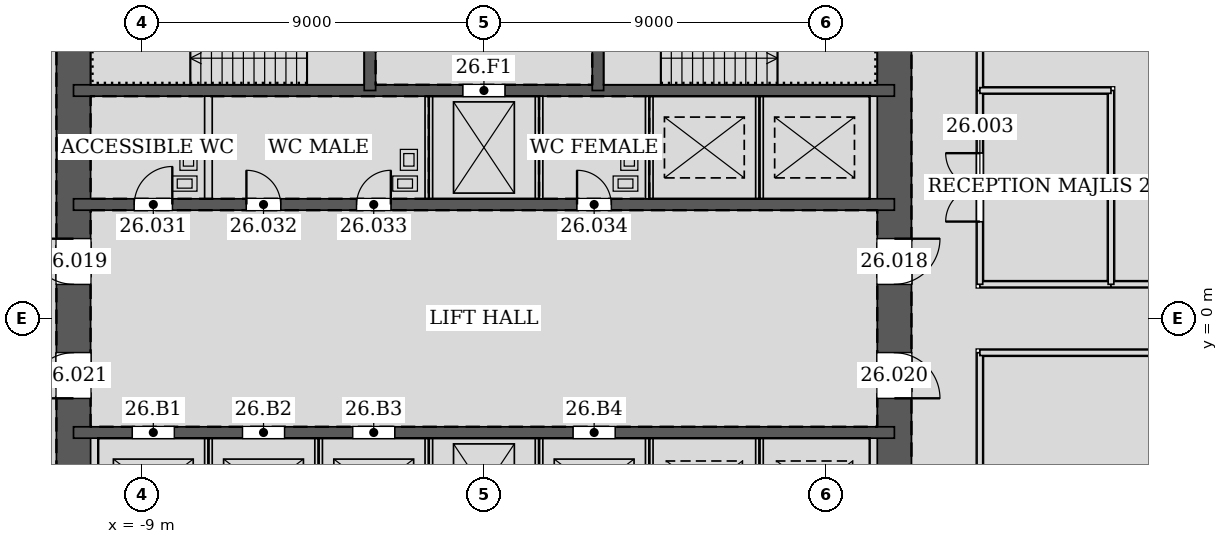
"""IFC4 building model, lengths in metres.
Left out: names, types, materials, properties, quantities, classifications, styles, units other than length and angle.
Written with IfcOpenShell. Run it as: python <this file> out.ifc"""

import sys

from ifc_helpers import new_model, si_unit, direction, frame, frame_2d, origin, place, context, subcontext, project, spatial, rectangle, extrude, element, fill, save


model = new_model("IFC4")
c1 = context("Model", 3, precision=1e-05, world=origin(), true_north=direction((0.0, 1.0)))
c2 = subcontext(c1, "Body", "Model", "MODEL_VIEW")
j1 = project(units=[si_unit("LENGTHUNIT", "METRE"), si_unit("PLANEANGLEUNIT", "RADIAN")], contexts=[c1])
p1 = place(None, origin())
s1 = spatial("IfcSite", under=j1, at=p1, CompositionType="ELEMENT")
p2 = place(p1, origin())
s2 = spatial("IfcBuilding", under=s1, at=p2, CompositionType="ELEMENT")
p3 = place(p2, frame((0.0, 0.0, 117.6)))
s3 = spatial("IfcBuildingStorey", under=s2, at=p3, CompositionType="ELEMENT", Elevation=117.6)
p4 = place(p3, frame((10.8, -10.8, 0.0), z_axis=(0.0, 0.0, 1.0), x_axis=(0.0, 1.0, 0.0)))
e1 = element("IfcWall", 1, at=p4, inside=s3, PredefinedType="SOLIDWALL", context=c2, shape_type="SweptSolid", body=[
    extrude(rectangle(XDim=21.6, YDim=0.9, at=frame_2d((10.8, 0.0))), origin(), (0.0, 0.0, 1.0), 4.2),
])
p5 = place(p4, frame((11.7, 0.0, 0.0)))
e2 = element("IfcOpeningElement", 2, at=p5, cuts=e1, PredefinedType="OPENING", context=c2, shape_type="SweptSolid", body=[
    extrude(rectangle(XDim=1.2, YDim=2.1, at=frame_2d((0.6, 1.05))), frame((0.0, 0.46, 0.0), z_axis=(0.0, -1.0, 0.0), x_axis=(1.0, 0.0, 0.0)), (0.0, 0.0, 1.0), 0.92),
])
p6 = place(p4, frame((8.7, 0.0, 0.0)))
e3 = element("IfcOpeningElement", 3, at=p6, cuts=e1, PredefinedType="OPENING", context=c2, shape_type="SweptSolid", body=[
    extrude(rectangle(XDim=1.2, YDim=2.1, at=frame_2d((0.6, 1.05))), frame((0.0, 0.46, 0.0), z_axis=(0.0, -1.0, 0.0), x_axis=(1.0, 0.0, 0.0)), (0.0, 0.0, 1.0), 0.92),
])
p7 = place(p3, frame((-10.8, 10.8, 0.0), z_axis=(0.0, 0.0, 1.0), x_axis=(0.0, -1.0, 0.0)))
e4 = element("IfcWall", 4, at=p7, inside=s3, PredefinedType="SOLIDWALL", context=c2, shape_type="SweptSolid", body=[
    extrude(rectangle(XDim=21.6, YDim=0.9, at=frame_2d((10.8, 0.0))), origin(), (0.0, 0.0, 1.0), 4.2),
])
p8 = place(p7, frame((8.7, 0.0, 0.0)))
e5 = element("IfcOpeningElement", 5, at=p8, cuts=e4, PredefinedType="OPENING", context=c2, shape_type="SweptSolid", body=[
    extrude(rectangle(XDim=1.2, YDim=2.1, at=frame_2d((0.6, 1.05))), frame((0.0, 0.46, 0.0), z_axis=(0.0, -1.0, 0.0), x_axis=(1.0, 0.0, 0.0)), (0.0, 0.0, 1.0), 0.92),
])
p9 = place(p7, frame((11.7, 0.0, 0.0)))
e6 = element("IfcOpeningElement", 6, at=p9, cuts=e4, PredefinedType="OPENING", context=c2, shape_type="SweptSolid", body=[
    extrude(rectangle(XDim=1.2, YDim=2.1, at=frame_2d((0.6, 1.05))), frame((0.0, 0.46, 0.0), z_axis=(0.0, -1.0, 0.0), x_axis=(1.0, 0.0, 0.0)), (0.0, 0.0, 1.0), 0.92),
])
p10 = place(p3, frame((-10.8, 3.0, 0.0), z_axis=(0.0, 0.0, 1.0), x_axis=(1.0, 0.0, 0.0)))
e7 = element("IfcWall", 7, at=p10, inside=s3, PredefinedType="SOLIDWALL", context=c2, shape_type="SweptSolid", body=[
    extrude(rectangle(XDim=21.6, YDim=0.3, at=frame_2d((10.8, 0.0))), origin(), (0.0, 0.0, 1.0), 4.2),
])
p11 = place(p10, frame((1.6, 0.0, 0.0)))
e8 = element("IfcOpeningElement", 8, at=p11, cuts=e7, PredefinedType="OPENING", context=c2, shape_type="SweptSolid", body=[
    extrude(rectangle(XDim=1.0, YDim=2.1, at=frame_2d((0.5, 1.05))), frame((0.0, 0.16, 0.0), z_axis=(0.0, -1.0, 0.0), x_axis=(1.0, 0.0, 0.0)), (0.0, 0.0, 1.0), 0.32),
])
p12 = place(p10, frame((4.55, 0.0, 0.0)))
e9 = element("IfcOpeningElement", 9, at=p12, cuts=e7, PredefinedType="OPENING", context=c2, shape_type="SweptSolid", body=[
    extrude(rectangle(XDim=0.9, YDim=2.1, at=frame_2d((0.45, 1.05))), frame((0.0, 0.16, 0.0), z_axis=(0.0, -1.0, 0.0), x_axis=(1.0, 0.0, 0.0)), (0.0, 0.0, 1.0), 0.32),
])
p13 = place(p10, frame((7.45, 0.0, 0.0)))
e10 = element("IfcOpeningElement", 10, at=p13, cuts=e7, PredefinedType="OPENING", context=c2, shape_type="SweptSolid", body=[
    extrude(rectangle(XDim=0.9, YDim=2.1, at=frame_2d((0.45, 1.05))), frame((0.0, 0.16, 0.0), z_axis=(0.0, -1.0, 0.0), x_axis=(1.0, 0.0, 0.0)), (0.0, 0.0, 1.0), 0.32),
])
p14 = place(p10, frame((13.25, 0.0, 0.0)))
e11 = element("IfcOpeningElement", 11, at=p14, cuts=e7, PredefinedType="OPENING", context=c2, shape_type="SweptSolid", body=[
    extrude(rectangle(XDim=0.9, YDim=2.1, at=frame_2d((0.45, 1.05))), frame((0.0, 0.16, 0.0), z_axis=(0.0, -1.0, 0.0), x_axis=(1.0, 0.0, 0.0)), (0.0, 0.0, 1.0), 0.32),
])
p15 = place(p3, frame((-10.8, 6.0, 0.0), z_axis=(0.0, 0.0, 1.0), x_axis=(1.0, 0.0, 0.0)))
e12 = element("IfcWall", 12, at=p15, inside=s3, PredefinedType="SOLIDWALL", context=c2, shape_type="SweptSolid", body=[
    extrude(rectangle(XDim=21.6, YDim=0.3, at=frame_2d((10.8, 0.0))), origin(), (0.0, 0.0, 1.0), 4.2),
])
p16 = place(p15, frame((10.25, 0.0, 0.0)))
e13 = element("IfcOpeningElement", 13, at=p16, cuts=e12, PredefinedType="OPENING", context=c2, shape_type="SweptSolid", body=[
    extrude(rectangle(XDim=1.1, YDim=2.1, at=frame_2d((0.55, 1.05))), frame((0.0, 0.16, 0.0), z_axis=(0.0, -1.0, 0.0), x_axis=(1.0, 0.0, 0.0)), (0.0, 0.0, 1.0), 0.32),
])
p17 = place(p3, frame((-3.0, 6.0, 0.0), z_axis=(0.0, 0.0, 1.0), x_axis=(0.0, 1.0, 0.0)))
e14 = element("IfcWall", 14, at=p17, inside=s3, PredefinedType="SOLIDWALL", context=c2, shape_type="SweptSolid", body=[
    extrude(rectangle(XDim=4.8, YDim=0.3, at=frame_2d((2.4, 0.0))), origin(), (0.0, 0.0, 1.0), 4.2),
])
p18 = place(p17, frame((1.75, 0.0, 0.0)))
e15 = element("IfcOpeningElement", 15, at=p18, cuts=e14, PredefinedType="OPENING", context=c2, shape_type="SweptSolid", body=[
    extrude(rectangle(XDim=1.0, YDim=2.1, at=frame_2d((0.5, 1.05))), frame((0.0, 0.16, 0.0), z_axis=(0.0, -1.0, 0.0), x_axis=(1.0, 0.0, 0.0)), (0.0, 0.0, 1.0), 0.32),
])
p19 = place(p3, frame((3.0, 6.0, 0.0), z_axis=(0.0, 0.0, 1.0), x_axis=(0.0, 1.0, 0.0)))
e16 = element("IfcWall", 16, at=p19, inside=s3, PredefinedType="SOLIDWALL", context=c2, shape_type="SweptSolid", body=[
    extrude(rectangle(XDim=4.8, YDim=0.3, at=frame_2d((2.4, 0.0))), origin(), (0.0, 0.0, 1.0), 4.2),
])
p20 = place(p19, frame((1.75, 0.0, 0.0)))
e17 = element("IfcOpeningElement", 17, at=p20, cuts=e16, PredefinedType="OPENING", context=c2, shape_type="SweptSolid", body=[
    extrude(rectangle(XDim=1.0, YDim=2.1, at=frame_2d((0.5, 1.05))), frame((0.0, 0.16, 0.0), z_axis=(0.0, -1.0, 0.0), x_axis=(1.0, 0.0, 0.0)), (0.0, 0.0, 1.0), 0.32),
])
p21 = place(p3, frame((-10.8, -3.0, 0.0), z_axis=(0.0, 0.0, 1.0), x_axis=(1.0, 0.0, 0.0)))
e18 = element("IfcWall", 18, at=p21, inside=s3, PredefinedType="SOLIDWALL", context=c2, shape_type="SweptSolid", body=[
    extrude(rectangle(XDim=21.6, YDim=0.3, at=frame_2d((10.8, 0.0))), origin(), (0.0, 0.0, 1.0), 4.2),
])
p22 = place(p21, frame((1.55, 0.0, 0.0)))
e19 = element("IfcOpeningElement", 19, at=p22, cuts=e18, PredefinedType="OPENING", context=c2, shape_type="SweptSolid", body=[
    extrude(rectangle(XDim=1.1, YDim=2.1, at=frame_2d((0.55, 1.05))), frame((0.0, 0.16, 0.0), z_axis=(0.0, -1.0, 0.0), x_axis=(1.0, 0.0, 0.0)), (0.0, 0.0, 1.0), 0.32),
])
p23 = place(p21, frame((4.45, 0.0, 0.0)))
e20 = element("IfcOpeningElement", 20, at=p23, cuts=e18, PredefinedType="OPENING", context=c2, shape_type="SweptSolid", body=[
    extrude(rectangle(XDim=1.1, YDim=2.1, at=frame_2d((0.55, 1.05))), frame((0.0, 0.16, 0.0), z_axis=(0.0, -1.0, 0.0), x_axis=(1.0, 0.0, 0.0)), (0.0, 0.0, 1.0), 0.32),
])
p24 = place(p21, frame((7.35, 0.0, 0.0)))
e21 = element("IfcOpeningElement", 21, at=p24, cuts=e18, PredefinedType="OPENING", context=c2, shape_type="SweptSolid", body=[
    extrude(rectangle(XDim=1.1, YDim=2.1, at=frame_2d((0.55, 1.05))), frame((0.0, 0.16, 0.0), z_axis=(0.0, -1.0, 0.0), x_axis=(1.0, 0.0, 0.0)), (0.0, 0.0, 1.0), 0.32),
])
p25 = place(p21, frame((13.15, 0.0, 0.0)))
e22 = element("IfcOpeningElement", 22, at=p25, cuts=e18, PredefinedType="OPENING", context=c2, shape_type="SweptSolid", body=[
    extrude(rectangle(XDim=1.1, YDim=2.1, at=frame_2d((0.55, 1.05))), frame((0.0, 0.16, 0.0), z_axis=(0.0, -1.0, 0.0), x_axis=(1.0, 0.0, 0.0)), (0.0, 0.0, 1.0), 0.32),
])
p26 = place(p3, frame((16.501, 0.9, 0.0), z_axis=(0.0, 0.0, 1.0), x_axis=(-1.0, 0.0, 0.0)))
e23 = element("IfcWall", 23, at=p26, inside=s3, PredefinedType="PARTITIONING", context=c2, shape_type="SweptSolid", body=[
    extrude(rectangle(XDim=3.451, YDim=0.15, at=frame_2d((1.726, 0.0))), origin(), (0.0, 0.0, 1.0), 3.426),
])
p27 = place(p3, frame((13.05, 0.9, 0.0), z_axis=(0.0, 0.0, 1.0), x_axis=(0.0, 1.0, 0.0)))
e24 = element("IfcWall", 24, at=p27, inside=s3, PredefinedType="PARTITIONING", context=c2, shape_type="SweptSolid", body=[
    extrude(rectangle(XDim=5.101, YDim=0.15, at=frame_2d((2.551, 0.0))), origin(), (0.0, 0.0, 1.0), 4.035),
])
p28 = place(p27, frame((1.65, 0.0, 0.0)))
e25 = element("IfcOpeningElement", 25, at=p28, cuts=e24, PredefinedType="OPENING", context=c2, shape_type="SweptSolid", body=[
    extrude(rectangle(XDim=1.8, YDim=2.4, at=frame_2d((0.9, 1.2))), frame((0.0, 0.085, 0.0), z_axis=(0.0, -1.0, 0.0), x_axis=(1.0, 0.0, 0.0)), (0.0, 0.0, 1.0), 0.17),
])
p29 = place(p3, frame((13.05, 5.999, 0.0), z_axis=(0.0, 0.0, 1.0), x_axis=(0.0, 1.0, 0.0)))
e26 = element("IfcWall", 26, at=p29, inside=s3, PredefinedType="PARTITIONING", context=c2, shape_type="SweptSolid", body=[
    extrude(rectangle(XDim=7.051, YDim=0.15, at=frame_2d((3.525, 0.0))), origin(), (0.0, 0.0, 1.0), 3.098),
])
p30 = place(p3, frame((24.67, 0.9, 0.0), z_axis=(0.0, 0.0, 1.0), x_axis=(-1.0, 0.0, 0.0)))
e27 = element("IfcWall", 27, at=p30, inside=s3, PredefinedType="PARTITIONING", context=c2, shape_type="SweptSolid", body=[
    extrude(rectangle(XDim=8.171, YDim=0.15, at=frame_2d((4.085, 0.0))), origin(), (0.0, 0.0, 1.0), 3.491),
])
p31 = place(p3, frame((13.05, -13.05, 0.0), z_axis=(0.0, 0.0, 1.0), x_axis=(0.0, 1.0, 0.0)))
e28 = element("IfcWall", 28, at=p31, inside=s3, PredefinedType="PARTITIONING", context=c2, shape_type="SweptSolid", body=[
    extrude(rectangle(XDim=12.15, YDim=0.15, at=frame_2d((6.075, 0.0))), origin(), (0.0, 0.0, 1.0), 3.098),
])
p32 = place(p3, frame((13.05, -0.9, 0.0), z_axis=(0.0, 0.0, 1.0), x_axis=(1.0, 0.0, 0.0)))
e29 = element("IfcWall", 29, at=p32, inside=s3, PredefinedType="PARTITIONING", context=c2, shape_type="SweptSolid", body=[
    extrude(rectangle(XDim=11.62, YDim=0.15, at=frame_2d((5.81, 0.0))), origin(), (0.0, 0.0, 1.0), 3.426),
])
p33 = place(p3, frame((16.5, 0.9, 0.0), z_axis=(0.0, 0.0, 1.0), x_axis=(0.0, 1.0, 0.0)))
e30 = element("IfcWall", 30, at=p33, inside=s3, PredefinedType="PARTITIONING", context=c2, shape_type="SweptSolid", body=[
    extrude(rectangle(XDim=5.1, YDim=0.15, at=frame_2d((2.55, 0.0))), origin(), (0.0, 0.0, 1.0), 4.035),
])
p34 = place(p3, frame((16.5, 6.0, 0.0), z_axis=(0.0, 0.0, 1.0), x_axis=(-1.0, 0.0, 0.0)))
e31 = element("IfcWall", 31, at=p34, inside=s3, PredefinedType="PARTITIONING", context=c2, shape_type="SweptSolid", body=[
    extrude(rectangle(XDim=3.45, YDim=0.15, at=frame_2d((1.725, 0.0))), origin(), (0.0, 0.0, 1.0), 3.426),
])
for number, where, z_axis, x_axis in (
    (32, (-7.25, 3.15, 0.0), (0.0, 0.0, 1.0), (0.0, 1.0, 0.0)),
    (33, (-1.45, 3.15, 0.0), (0.0, 0.0, 1.0), (0.0, 1.0, 0.0)),
    (34, (1.45, 3.15, 0.0), (0.0, 0.0, 1.0), (0.0, 1.0, 0.0)),
    (35, (4.35, 3.15, 0.0), (0.0, 0.0, 1.0), (0.0, 1.0, 0.0)),
):
    element("IfcWall", number, at=place(p3, frame(where, z_axis=z_axis, x_axis=x_axis)), inside=s3, PredefinedType="PARTITIONING", context=c2, shape_type="SweptSolid", body=[
        extrude(rectangle(XDim=2.7, YDim=0.2, at=frame_2d((1.35, 0.0))), origin(), (0.0, 0.0, 1.0), 4.035),
    ])
for number, where, z_axis, x_axis in (
    (36, (7.25, 3.15, 0.0), (0.0, 0.0, 1.0), (0.0, 1.0, 0.0)),
    (37, (-7.25, -5.85, 0.0), (0.0, 0.0, 1.0), (0.0, 1.0, 0.0)),
    (38, (-4.35, -5.85, 0.0), (0.0, 0.0, 1.0), (0.0, 1.0, 0.0)),
    (39, (-1.45, -5.85, 0.0), (0.0, 0.0, 1.0), (0.0, 1.0, 0.0)),
    (40, (1.45, -5.85, 0.0), (0.0, 0.0, 1.0), (0.0, 1.0, 0.0)),
    (41, (4.35, -5.85, 0.0), (0.0, 0.0, 1.0), (0.0, 1.0, 0.0)),
    (42, (7.25, -5.85, 0.0), (0.0, 0.0, 1.0), (0.0, 1.0, 0.0)),
):
    element("IfcWall", number, at=place(p3, frame(where, z_axis=z_axis, x_axis=x_axis)), inside=s3, PredefinedType="PARTITIONING", context=c2, shape_type="SweptSolid", body=[
        extrude(rectangle(XDim=2.7, YDim=0.2, at=frame_2d((1.35, 0.0))), origin(), (0.0, 0.0, 1.0), 4.2),
    ])
p35 = place(p28, origin())
e43 = element("IfcDoor", 43, at=p35, inside=s3, OperationType="DOUBLE_DOOR_SINGLE_SWING", PredefinedType="DOOR", context=c2, shape_type="SweptSolid", body=[
    extrude(rectangle(XDim=1.8, YDim=2.4, at=frame_2d((0.9, 1.2))), frame((0.0, 0.025, 0.0), z_axis=(0.0, -1.0, 0.0), x_axis=(1.0, 0.0, 0.0)), (0.0, 0.0, 1.0), 0.05),
])
fill(e25, e43)
p36 = place(p5, frame((1.2, 0.0, 0.0), z_axis=(0.0, 0.0, 1.0), x_axis=(-1.0, 0.0, 0.0)))
e44 = element("IfcDoor", 44, at=p36, inside=s3, OperationType="SINGLE_SWING_LEFT", PredefinedType="DOOR", context=c2, shape_type="SweptSolid", body=[
    extrude(rectangle(XDim=1.2, YDim=2.1, at=frame_2d((0.6, 1.05))), frame((0.0, 0.025, 0.0), z_axis=(0.0, -1.0, 0.0), x_axis=(1.0, 0.0, 0.0)), (0.0, 0.0, 1.0), 0.05),
])
fill(e2, e44)
p37 = place(p8, frame((1.2, 0.0, 0.0), z_axis=(0.0, 0.0, 1.0), x_axis=(-1.0, 0.0, 0.0)))
e45 = element("IfcDoor", 45, at=p37, inside=s3, OperationType="SINGLE_SWING_RIGHT", PredefinedType="DOOR", context=c2, shape_type="SweptSolid", body=[
    extrude(rectangle(XDim=1.2, YDim=2.1, at=frame_2d((0.6, 1.05))), frame((0.0, 0.025, 0.0), z_axis=(0.0, -1.0, 0.0), x_axis=(1.0, 0.0, 0.0)), (0.0, 0.0, 1.0), 0.05),
])
fill(e5, e45)
p38 = place(p6, frame((1.2, 0.0, 0.0), z_axis=(0.0, 0.0, 1.0), x_axis=(-1.0, 0.0, 0.0)))
e46 = element("IfcDoor", 46, at=p38, inside=s3, OperationType="SINGLE_SWING_RIGHT", PredefinedType="DOOR", context=c2, shape_type="SweptSolid", body=[
    extrude(rectangle(XDim=1.2, YDim=2.1, at=frame_2d((0.6, 1.05))), frame((0.0, 0.025, 0.0), z_axis=(0.0, -1.0, 0.0), x_axis=(1.0, 0.0, 0.0)), (0.0, 0.0, 1.0), 0.05),
])
fill(e3, e46)
p39 = place(p9, frame((1.2, 0.0, 0.0), z_axis=(0.0, 0.0, 1.0), x_axis=(-1.0, 0.0, 0.0)))
e47 = element("IfcDoor", 47, at=p39, inside=s3, OperationType="SINGLE_SWING_LEFT", PredefinedType="DOOR", context=c2, shape_type="SweptSolid", body=[
    extrude(rectangle(XDim=1.2, YDim=2.1, at=frame_2d((0.6, 1.05))), frame((0.0, 0.025, 0.0), z_axis=(0.0, -1.0, 0.0), x_axis=(1.0, 0.0, 0.0)), (0.0, 0.0, 1.0), 0.05),
])
fill(e6, e47)
p40 = place(p11, origin())
e48 = element("IfcDoor", 48, at=p40, inside=s3, OperationType="SINGLE_SWING_RIGHT", PredefinedType="DOOR", context=c2, shape_type="SweptSolid", body=[
    extrude(rectangle(XDim=1.0, YDim=2.1, at=frame_2d((0.5, 1.05))), frame((0.0, 0.025, 0.0), z_axis=(0.0, -1.0, 0.0), x_axis=(1.0, 0.0, 0.0)), (0.0, 0.0, 1.0), 0.05),
])
fill(e8, e48)
p41 = place(p12, origin())
e49 = element("IfcDoor", 49, at=p41, inside=s3, OperationType="SINGLE_SWING_LEFT", PredefinedType="DOOR", context=c2, shape_type="SweptSolid", body=[
    extrude(rectangle(XDim=0.9, YDim=2.1, at=frame_2d((0.45, 1.05))), frame((0.0, 0.025, 0.0), z_axis=(0.0, -1.0, 0.0), x_axis=(1.0, 0.0, 0.0)), (0.0, 0.0, 1.0), 0.05),
])
fill(e9, e49)
p42 = place(p13, origin())
e50 = element("IfcDoor", 50, at=p42, inside=s3, OperationType="SINGLE_SWING_RIGHT", PredefinedType="DOOR", context=c2, shape_type="SweptSolid", body=[
    extrude(rectangle(XDim=0.9, YDim=2.1, at=frame_2d((0.45, 1.05))), frame((0.0, 0.025, 0.0), z_axis=(0.0, -1.0, 0.0), x_axis=(1.0, 0.0, 0.0)), (0.0, 0.0, 1.0), 0.05),
])
fill(e10, e50)
p43 = place(p14, origin())
e51 = element("IfcDoor", 51, at=p43, inside=s3, OperationType="SINGLE_SWING_LEFT", PredefinedType="DOOR", context=c2, shape_type="SweptSolid", body=[
    extrude(rectangle(XDim=0.9, YDim=2.1, at=frame_2d((0.45, 1.05))), frame((0.0, 0.025, 0.0), z_axis=(0.0, -1.0, 0.0), x_axis=(1.0, 0.0, 0.0)), (0.0, 0.0, 1.0), 0.05),
])
fill(e11, e51)
p44 = place(p16, origin())
e52 = element("IfcDoor", 52, at=p44, inside=s3, OperationType="DOUBLE_DOOR_SLIDING", PredefinedType="DOOR", context=c2, shape_type="SweptSolid", body=[
    extrude(rectangle(XDim=1.1, YDim=2.1, at=frame_2d((0.55, 1.05))), frame((0.0, 0.025, 0.0), z_axis=(0.0, -1.0, 0.0), x_axis=(1.0, 0.0, 0.0)), (0.0, 0.0, 1.0), 0.05),
])
fill(e13, e52)
p45 = place(p22, origin())
e53 = element("IfcDoor", 53, at=p45, inside=s3, OperationType="DOUBLE_DOOR_SLIDING", PredefinedType="DOOR", context=c2, shape_type="SweptSolid", body=[
    extrude(rectangle(XDim=1.1, YDim=2.1, at=frame_2d((0.55, 1.05))), frame((0.0, 0.025, 0.0), z_axis=(0.0, -1.0, 0.0), x_axis=(1.0, 0.0, 0.0)), (0.0, 0.0, 1.0), 0.05),
])
fill(e19, e53)
p46 = place(p23, origin())
e54 = element("IfcDoor", 54, at=p46, inside=s3, OperationType="DOUBLE_DOOR_SLIDING", PredefinedType="DOOR", context=c2, shape_type="SweptSolid", body=[
    extrude(rectangle(XDim=1.1, YDim=2.1, at=frame_2d((0.55, 1.05))), frame((0.0, 0.025, 0.0), z_axis=(0.0, -1.0, 0.0), x_axis=(1.0, 0.0, 0.0)), (0.0, 0.0, 1.0), 0.05),
])
fill(e20, e54)
p47 = place(p24, origin())
e55 = element("IfcDoor", 55, at=p47, inside=s3, OperationType="DOUBLE_DOOR_SLIDING", PredefinedType="DOOR", context=c2, shape_type="SweptSolid", body=[
    extrude(rectangle(XDim=1.1, YDim=2.1, at=frame_2d((0.55, 1.05))), frame((0.0, 0.025, 0.0), z_axis=(0.0, -1.0, 0.0), x_axis=(1.0, 0.0, 0.0)), (0.0, 0.0, 1.0), 0.05),
])
fill(e21, e55)
p48 = place(p25, origin())
e56 = element("IfcDoor", 56, at=p48, inside=s3, OperationType="DOUBLE_DOOR_SLIDING", PredefinedType="DOOR", context=c2, shape_type="SweptSolid", body=[
    extrude(rectangle(XDim=1.1, YDim=2.1, at=frame_2d((0.55, 1.05))), frame((0.0, 0.025, 0.0), z_axis=(0.0, -1.0, 0.0), x_axis=(1.0, 0.0, 0.0)), (0.0, 0.0, 1.0), 0.05),
])
fill(e22, e56)
save(model, sys.argv[1])
